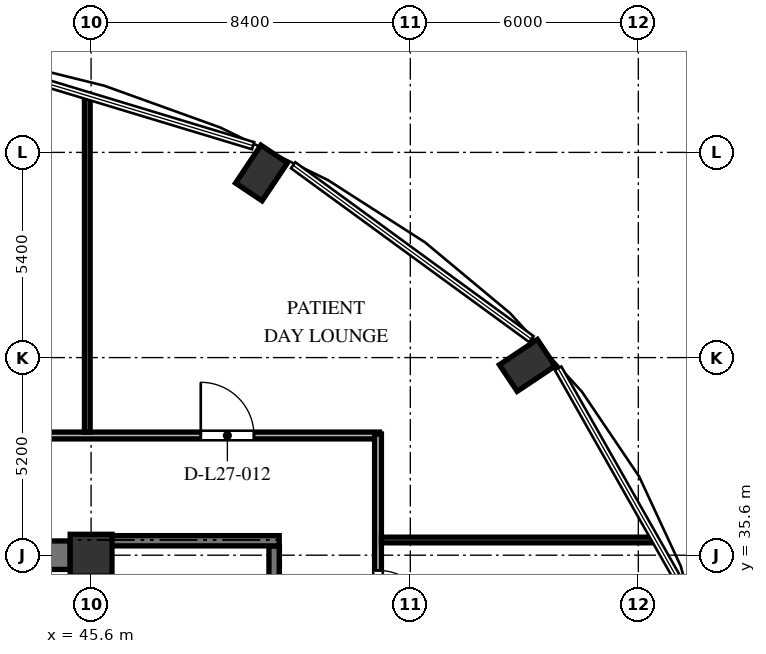
"""IFC4 building model, lengths in metres.
Left out: names, types, materials, properties, quantities, classifications, styles, units other than length and angle.
Written with IfcOpenShell. Run it as: python <this file> out.ifc"""

import sys

from ifc_helpers import new_model, si_unit, direction, frame, frame_2d, origin, origin_2d, place, context, subcontext, project, spatial, rectangle, extrude, element, fill, save


model = new_model("IFC4")
c1 = context("Model", 3, precision=1e-05, world=origin(), true_north=direction((0.0, 1.0)))
c2 = subcontext(c1, "Body", "Model", "MODEL_VIEW")
j1 = project(units=[si_unit("LENGTHUNIT", "METRE"), si_unit("PLANEANGLEUNIT", "RADIAN")], contexts=[c1])
p1 = place(None, origin())
s1 = spatial("IfcSite", under=j1, at=p1, CompositionType="ELEMENT")
p2 = place(p1, origin())
s2 = spatial("IfcBuilding", under=s1, at=p2, CompositionType="ELEMENT")
p3 = place(p2, frame((0.0, 0.0, 107.28)))
s3 = spatial("IfcBuildingStorey", under=s2, at=p3, CompositionType="ELEMENT", Elevation=107.28)
for number, where, z_axis, x_axis in (
    (1, (57.078, 40.595, 0.0), (0.0, 0.0, 1.0), (0.831, 0.556, 0.0)),
    (2, (50.084, 45.657, 0.0), (0.0, 0.0, 1.0), (0.556, 0.831, 0.0)),
):
    element("IfcColumn", number, at=place(p3, frame(where, z_axis=z_axis, x_axis=x_axis)), inside=s3, PredefinedType="COLUMN", context=c2, shape_type="SweptSolid", body=[
        extrude(rectangle(XDim=1.2, YDim=0.84, at=origin_2d()), origin(), (0.0, 0.0, 1.0), 3.648),
    ])
p4 = place(p3, frame((45.6, 35.6, 0.0), z_axis=(0.0, 0.0, 1.0), x_axis=(1.0, 0.0, 0.0)))
e3 = element("IfcColumn", 3, at=p4, inside=s3, PredefinedType="COLUMN", context=c2, shape_type="SweptSolid", body=[
    extrude(rectangle(XDim=1.1, YDim=1.1, at=origin_2d()), origin(), (0.0, 0.0, 1.0), 3.648),
])
p5 = place(p3, frame((39.675, 35.6, 0.0), z_axis=(0.0, 0.0, 1.0), x_axis=(1.0, 0.0, 0.0)))
e4 = element("IfcWall", 4, at=p5, inside=s3, PredefinedType="SHEAR", context=c2, shape_type="SweptSolid", body=[
    extrude(rectangle(XDim=5.375, YDim=0.75, at=frame_2d((2.688, 0.0))), origin(), (0.0, 0.0, 1.0), 3.648),
])
p6 = place(p3, frame((50.415, 35.845, 0.0), z_axis=(0.0, 0.0, 1.0), x_axis=(0.0, -1.0, 0.0)))
e5 = element("IfcWall", 5, at=p6, inside=s3, PredefinedType="SHEAR", context=c2, shape_type="SweptSolid", body=[
    extrude(rectangle(XDim=15.825, YDim=0.27, at=frame_2d((7.913, 0.0))), origin(), (0.0, 0.0, 1.0), 3.648),
])
p7 = place(p6, frame((4.445, 0.0, 0.0)))
e6 = element("IfcOpeningElement", 6, at=p7, cuts=e5, PredefinedType="OPENING", context=c2, shape_type="SweptSolid", body=[
    extrude(rectangle(XDim=1.2, YDim=2.15, at=frame_2d((0.6, 1.075))), frame((0.0, 0.145, 0.0), z_axis=(0.0, -1.0, 0.0), x_axis=(1.0, 0.0, 0.0)), (0.0, 0.0, 1.0), 0.29),
])
p8 = place(p6, frame((1.295, 0.0, 0.0)))
e7 = element("IfcOpeningElement", 7, at=p8, cuts=e5, PredefinedType="OPENING", context=c2, shape_type="SweptSolid", body=[
    extrude(rectangle(XDim=1.3, YDim=2.2, at=frame_2d((0.65, 1.1))), frame((0.0, 0.145, 0.0), z_axis=(0.0, -1.0, 0.0), x_axis=(1.0, 0.0, 0.0)), (0.0, 0.0, 1.0), 0.29),
])
p9 = place(p6, frame((13.095, 0.0, 0.0)))
e8 = element("IfcOpeningElement", 8, at=p9, cuts=e5, PredefinedType="OPENING", context=c2, shape_type="SweptSolid", body=[
    extrude(rectangle(XDim=1.3, YDim=2.2, at=frame_2d((0.65, 1.1))), frame((0.0, 0.145, 0.0), z_axis=(0.0, -1.0, 0.0), x_axis=(1.0, 0.0, 0.0)), (0.0, 0.0, 1.0), 0.29),
])
p10 = place(p3, frame((46.075, 35.98, 0.0), z_axis=(0.0, 0.0, 1.0), x_axis=(1.0, 0.0, 0.0)))
e9 = element("IfcWall", 9, at=p10, inside=s3, PredefinedType="SHEAR", context=c2, shape_type="SweptSolid", body=[
    extrude(rectangle(XDim=4.475, YDim=0.27, at=frame_2d((2.238, 0.0))), origin(), (0.0, 0.0, 1.0), 3.648),
])
p11 = place(p3, frame((23.31, 38.75, 0.0), z_axis=(0.0, 0.0, 1.0), x_axis=(1.0, 0.0, 0.0)))
e10 = element("IfcWall", 10, at=p11, inside=s3, PredefinedType="PARTITIONING", context=c2, shape_type="SweptSolid", body=[
    extrude(rectangle(XDim=29.88, YDim=0.18, at=frame_2d((14.94, 0.0))), origin(), (0.0, 0.0, 1.0), 3.053),
])
p12 = place(p11, frame((25.176, 0.0, 0.0)))
e11 = element("IfcOpeningElement", 11, at=p12, cuts=e10, PredefinedType="OPENING", context=c2, shape_type="SweptSolid", body=[
    extrude(rectangle(XDim=1.4, YDim=2.2, at=frame_2d((0.7, 1.1))), frame((0.0, 0.1, 0.0), z_axis=(0.0, -1.0, 0.0), x_axis=(1.0, 0.0, 0.0)), (0.0, 0.0, 1.0), 0.2),
])
p13 = place(p11, frame((18.989, 0.0, 0.0)))
e12 = element("IfcOpeningElement", 12, at=p13, cuts=e10, PredefinedType="OPENING", context=c2, shape_type="SweptSolid", body=[
    extrude(rectangle(XDim=1.4, YDim=2.2, at=frame_2d((0.7, 1.1))), frame((0.0, 0.1, 0.0), z_axis=(0.0, -1.0, 0.0), x_axis=(1.0, 0.0, 0.0)), (0.0, 0.0, 1.0), 0.2),
])
p14 = place(p11, frame((12.589, 0.0, 0.0)))
e13 = element("IfcOpeningElement", 13, at=p14, cuts=e10, PredefinedType="OPENING", context=c2, shape_type="SweptSolid", body=[
    extrude(rectangle(XDim=1.4, YDim=2.2, at=frame_2d((0.7, 1.1))), frame((0.0, 0.1, 0.0), z_axis=(0.0, -1.0, 0.0), x_axis=(1.0, 0.0, 0.0)), (0.0, 0.0, 1.0), 0.2),
])
p15 = place(p11, frame((8.188, 0.0, 0.0)))
e14 = element("IfcOpeningElement", 14, at=p15, cuts=e10, PredefinedType="OPENING", context=c2, shape_type="SweptSolid", body=[
    extrude(rectangle(XDim=1.4, YDim=2.2, at=frame_2d((0.7, 1.1))), frame((0.0, 0.1, 0.0), z_axis=(0.0, -1.0, 0.0), x_axis=(1.0, 0.0, 0.0)), (0.0, 0.0, 1.0), 0.2),
])
p16 = place(p3, frame((53.15, 38.79, 0.0), z_axis=(0.0, 0.0, 1.0), x_axis=(0.0, -1.0, 0.0)))
e15 = element("IfcWall", 15, at=p16, inside=s3, PredefinedType="PARTITIONING", context=c2, shape_type="SweptSolid", body=[
    extrude(rectangle(XDim=9.43, YDim=0.18, at=frame_2d((4.715, 0.0))), origin(), (0.0, 0.0, 1.0), 3.428),
])
p17 = place(p16, frame((3.59, 0.0, 0.0)))
e16 = element("IfcOpeningElement", 16, at=p17, cuts=e15, PredefinedType="OPENING", context=c2, shape_type="SweptSolid", body=[
    extrude(rectangle(XDim=1.4, YDim=2.2, at=frame_2d((0.7, 1.1))), frame((0.0, 0.1, 0.0), z_axis=(0.0, -1.0, 0.0), x_axis=(1.0, 0.0, 0.0)), (0.0, 0.0, 1.0), 0.2),
])
p18 = place(p3, frame((53.24, 36.0, 0.0), z_axis=(0.0, 0.0, 1.0), x_axis=(1.0, 0.0, 0.0)))
e17 = element("IfcWall", 17, at=p18, inside=s3, PredefinedType="PARTITIONING", context=c2, shape_type="SweptSolid", body=[
    extrude(rectangle(XDim=7.207, YDim=0.15, at=frame_2d((3.604, 0.0))), origin(), (0.0, 0.0, 1.0), 3.428),
])
p19 = place(p3, frame((45.5, 38.84, 0.0), z_axis=(0.0, 0.0, 1.0), x_axis=(0.0, 1.0, 0.0)))
e18 = element("IfcWall", 18, at=p19, inside=s3, PredefinedType="PARTITIONING", context=c2, shape_type="SweptSolid", body=[
    extrude(rectangle(XDim=8.84, YDim=0.15, at=frame_2d((4.42, 0.0))), origin(), (0.0, 0.0, 1.0), 3.428),
])
p20 = place(p17, origin())
e19 = element("IfcDoor", 19, at=p20, inside=s3, OperationType="SINGLE_SWING_RIGHT", PredefinedType="DOOR", context=c2, shape_type="SweptSolid", body=[
    extrude(rectangle(XDim=1.4, YDim=2.2, at=frame_2d((0.7, 1.1))), frame((0.0, 0.025, 0.0), z_axis=(0.0, -1.0, 0.0), x_axis=(1.0, 0.0, 0.0)), (0.0, 0.0, 1.0), 0.05),
])
fill(e16, e19)
p21 = place(p12, origin())
e20 = element("IfcDoor", 20, at=p21, inside=s3, OperationType="SINGLE_SWING_LEFT", PredefinedType="DOOR", context=c2, shape_type="SweptSolid", body=[
    extrude(rectangle(XDim=1.4, YDim=2.2, at=frame_2d((0.7, 1.1))), frame((0.0, 0.025, 0.0), z_axis=(0.0, -1.0, 0.0), x_axis=(1.0, 0.0, 0.0)), (0.0, 0.0, 1.0), 0.05),
])
fill(e11, e20)
save(model, sys.argv[1])
